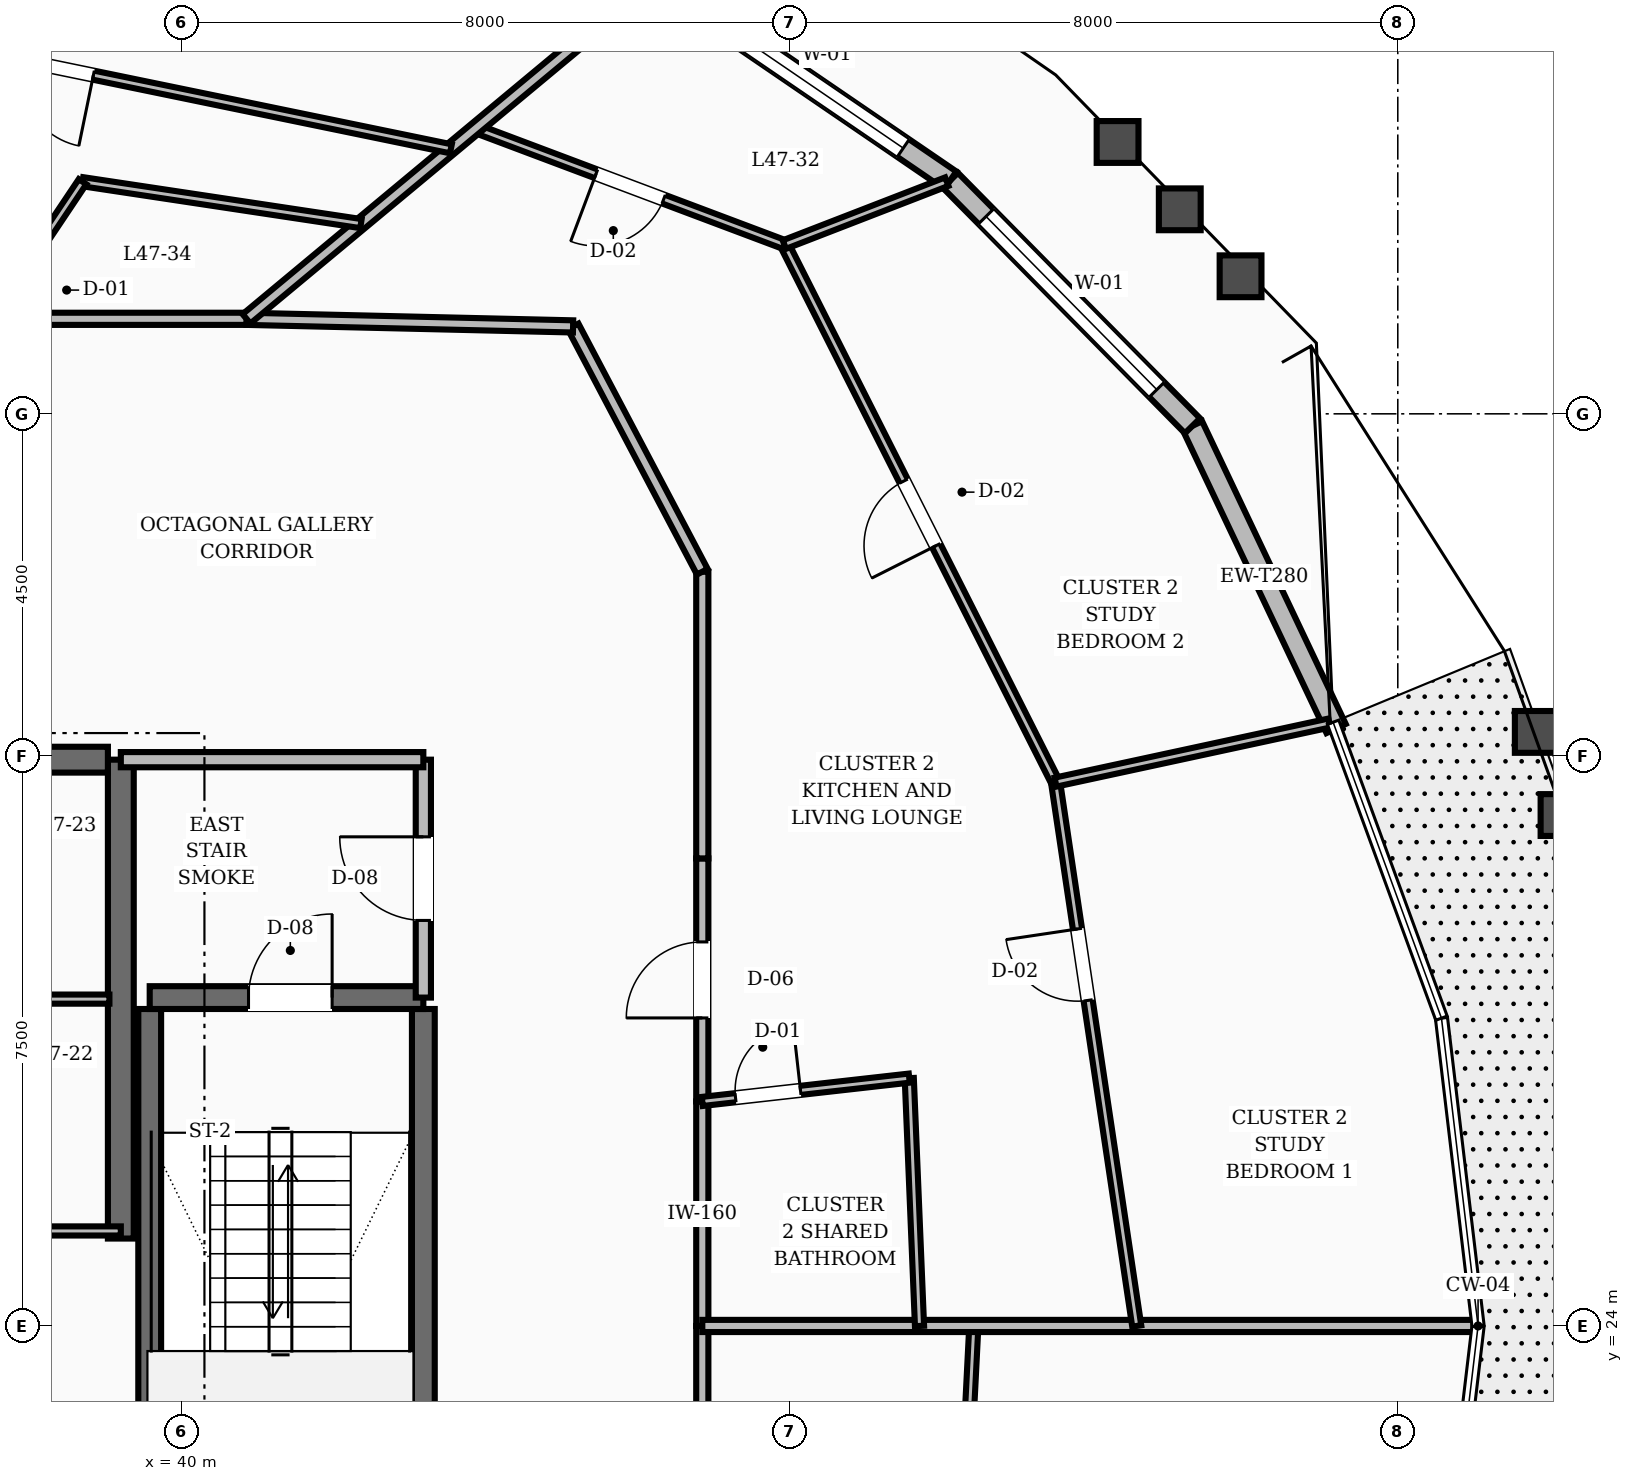
"""IFC4 building model, lengths in metres.
Left out: names, types, materials, properties, quantities, classifications, styles, units other than length and angle.
Written with IfcOpenShell. Run it as: python <this file> out.ifc"""

import sys

from ifc_helpers import new_model, si_unit, direction, frame, frame_2d, origin, place, context, subcontext, project, spatial, rectangle, extrude, element, fill, save


model = new_model("IFC4")
c1 = context("Model", 3, precision=1e-05, world=origin(), true_north=direction((0.0, 1.0)))
c2 = subcontext(c1, "Body", "Model", "MODEL_VIEW")
j1 = project(units=[si_unit("LENGTHUNIT", "METRE"), si_unit("PLANEANGLEUNIT", "RADIAN")], contexts=[c1])
p1 = place(None, origin())
s1 = spatial("IfcSite", under=j1, at=p1, CompositionType="ELEMENT")
p2 = place(p1, origin())
s2 = spatial("IfcBuilding", under=s1, at=p2, CompositionType="ELEMENT")
p3 = place(p2, frame((0.0, 0.0, 182.0)))
s3 = spatial("IfcBuildingStorey", under=s2, at=p3, CompositionType="ELEMENT", Elevation=182.0)
p4 = place(p3, frame((39.2, 25.15, 0.0), z_axis=(0.0, 0.0, 1.0), x_axis=(0.0, 1.0, 0.0)))
e1 = element("IfcWall", 1, at=p4, inside=s3, PredefinedType="SHEAR", context=c2, shape_type="SweptSolid", body=[
    extrude(rectangle(XDim=6.3, YDim=0.34, at=frame_2d((3.15, 0.0))), origin(), (0.0, 0.0, 1.0), 3.6),
])
p5 = place(p3, frame((35.8, 31.45, 0.0), z_axis=(0.0, 0.0, 1.0), x_axis=(1.0, 0.0, 0.0)))
e2 = element("IfcWall", 2, at=p5, inside=s3, PredefinedType="SHEAR", context=c2, shape_type="SweptSolid", body=[
    extrude(rectangle(XDim=3.23, YDim=0.34, at=frame_2d((1.615, 0.0))), origin(), (0.0, 0.0, 1.0), 3.6),
])
p6 = place(p5, frame((0.3, 0.0, 0.0)))
e3 = element("IfcOpeningElement", 3, at=p6, cuts=e2, PredefinedType="OPENING", context=c2, shape_type="SweptSolid", body=[
    extrude(rectangle(XDim=1.1, YDim=2.1, at=frame_2d((0.55, 1.05))), frame((0.0, 0.18, 0.0), z_axis=(0.0, -1.0, 0.0), x_axis=(1.0, 0.0, 0.0)), (0.0, 0.0, 1.0), 0.36),
])
for number, where, z_axis, x_axis in (
    (4, (43.18, 19.43, 0.0), (0.0, 0.0, 1.0), (0.0, 1.0, 0.0)),
    (5, (39.58, 19.43, 0.0), (0.0, 0.0, 1.0), (0.0, 1.0, 0.0)),
):
    element("IfcWall", number, at=place(p3, frame(where, z_axis=z_axis, x_axis=x_axis)), inside=s3, PredefinedType="SHEAR", context=c2, shape_type="SweptSolid", body=[
        extrude(rectangle(XDim=8.74, YDim=0.3, at=frame_2d((4.37, 0.0))), origin(), (0.0, 0.0, 1.0), 3.6),
    ])
p7 = place(p3, frame((39.58, 28.32, 0.0), z_axis=(0.0, 0.0, 1.0), x_axis=(1.0, 0.0, 0.0)))
e6 = element("IfcWall", 6, at=p7, inside=s3, PredefinedType="SHEAR", context=c2, shape_type="SweptSolid", body=[
    extrude(rectangle(XDim=3.6, YDim=0.3, at=frame_2d((1.8, 0.0))), origin(), (0.0, 0.0, 1.0), 3.6),
])
p8 = place(p7, frame((1.3, 0.0, 0.0)))
e7 = element("IfcOpeningElement", 7, at=p8, cuts=e6, PredefinedType="OPENING", context=c2, shape_type="SweptSolid", body=[
    extrude(rectangle(XDim=1.1, YDim=2.1, at=frame_2d((0.55, 1.05))), frame((0.0, 0.16, 0.0), z_axis=(0.0, -1.0, 0.0), x_axis=(1.0, 0.0, 0.0)), (0.0, 0.0, 1.0), 0.32),
])
p9 = place(p3, frame((55.188, 31.86, 0.0), z_axis=(0.0, 0.0, 1.0), x_axis=(-0.428595800286, 0.903496341983, 0.0)))
e8 = element("IfcWall", 8, at=p9, inside=s3, PredefinedType="STANDARD", context=c2, shape_type="SweptSolid", body=[
    extrude(rectangle(XDim=4.408, YDim=0.28, at=frame_2d((2.204, 0.0))), origin(), (0.0, 0.0, 1.0), 2.82),
])
p10 = place(p3, frame((53.299, 35.842, 0.0), z_axis=(0.0, 0.0, 1.0), x_axis=(-0.70219293187, 0.711986717876, 0.0)))
e9 = element("IfcWall", 9, at=p10, inside=s3, PredefinedType="STANDARD", context=c2, shape_type="SweptSolid", body=[
    extrude(rectangle(XDim=4.537, YDim=0.28, at=frame_2d((2.269, 0.0))), origin(), (0.0, 0.0, 1.0), 2.82),
])
p11 = place(p10, frame((0.668, 0.0, 0.8)))
e10 = element("IfcOpeningElement", 10, at=p11, cuts=e9, PredefinedType="OPENING", context=c2, shape_type="SweptSolid", body=[
    extrude(rectangle(XDim=3.2, YDim=1.65, at=frame_2d((1.6, 0.825))), frame((0.0, 0.15, 0.0), z_axis=(0.0, -1.0, 0.0), x_axis=(1.0, 0.0, 0.0)), (0.0, 0.0, 1.0), 0.3),
])
p12 = place(p3, frame((50.113, 39.073, 0.0), z_axis=(0.0, 0.0, 1.0), x_axis=(-0.825797441916, 0.563966829632, 0.0)))
e11 = element("IfcWall", 11, at=p12, inside=s3, PredefinedType="STANDARD", context=c2, shape_type="SweptSolid", body=[
    extrude(rectangle(XDim=4.7, YDim=0.28, at=frame_2d((2.35, 0.0))), origin(), (0.0, 0.0, 1.0), 2.82),
])
p13 = place(p12, frame((0.75, 0.0, 0.8)))
e12 = element("IfcOpeningElement", 12, at=p13, cuts=e11, PredefinedType="OPENING", context=c2, shape_type="SweptSolid", body=[
    extrude(rectangle(XDim=3.2, YDim=1.65, at=frame_2d((1.6, 0.825))), frame((0.0, 0.15, 0.0), z_axis=(0.0, -1.0, 0.0), x_axis=(1.0, 0.0, 0.0)), (0.0, 0.0, 1.0), 0.3),
])
p14 = place(p3, frame((43.18, 28.32, 0.0), z_axis=(0.0, 0.0, 1.0), x_axis=(0.0, 1.0, 0.0)))
e13 = element("IfcWall", 13, at=p14, inside=s3, PredefinedType="SOLIDWALL", context=c2, shape_type="SweptSolid", body=[
    extrude(rectangle(XDim=3.13, YDim=0.2, at=frame_2d((1.565, 0.0))), origin(), (0.0, 0.0, 1.0), 2.8),
])
p15 = place(p14, frame((1.015, 0.0, 0.0)))
e14 = element("IfcOpeningElement", 14, at=p15, cuts=e13, PredefinedType="OPENING", context=c2, shape_type="SweptSolid", body=[
    extrude(rectangle(XDim=1.1, YDim=2.1, at=frame_2d((0.55, 1.05))), frame((0.0, 0.11, 0.0), z_axis=(0.0, -1.0, 0.0), x_axis=(1.0, 0.0, 0.0)), (0.0, 0.0, 1.0), 0.22),
])
p16 = place(p3, frame((39.2, 31.45, 0.0), z_axis=(0.0, 0.0, 1.0), x_axis=(1.0, 0.0, 0.0)))
e15 = element("IfcWall", 15, at=p16, inside=s3, PredefinedType="SOLIDWALL", context=c2, shape_type="SweptSolid", body=[
    extrude(rectangle(XDim=3.98, YDim=0.2, at=frame_2d((1.99, 0.0))), origin(), (0.0, 0.0, 1.0), 2.8),
])
p17 = place(p3, frame((37.4, 25.25, 0.0), z_axis=(0.0, 0.0, 1.0), x_axis=(1.0, 0.0, 0.0)))
e16 = element("IfcWall", 16, at=p17, inside=s3, PredefinedType="PARTITIONING", context=c2, shape_type="SweptSolid", body=[
    extrude(rectangle(XDim=1.8, YDim=0.12, at=frame_2d((0.9, 0.0))), origin(), (0.0, 0.0, 1.0), 2.8),
])
p18 = place(p3, frame((37.4, 28.3, 0.0), z_axis=(0.0, 0.0, 1.0), x_axis=(1.0, 0.0, 0.0)))
e17 = element("IfcWall", 17, at=p18, inside=s3, PredefinedType="PARTITIONING", context=c2, shape_type="SweptSolid", body=[
    extrude(rectangle(XDim=1.65, YDim=0.12, at=frame_2d((0.825, 0.0))), origin(), (0.0, 0.0, 1.0), 2.8),
])
p19 = place(p3, frame((46.85, 24.0, 0.0), z_axis=(0.0, 0.0, 1.0), x_axis=(0.0, 1.0, 0.0)))
e18 = element("IfcWall", 18, at=p19, inside=s3, PredefinedType="SOLIDWALL", context=c2, shape_type="SweptSolid", body=[
    extrude(rectangle(XDim=2.954, YDim=0.16, at=frame_2d((1.477, 0.0))), origin(), (0.0, 0.0, 1.0), 2.8),
])
p20 = place(p3, frame((46.85, 26.954, 0.0), z_axis=(0.0, 0.0, 1.0), x_axis=(0.0, 1.0, 0.0)))
e19 = element("IfcWall", 19, at=p20, inside=s3, PredefinedType="SOLIDWALL", context=c2, shape_type="SweptSolid", body=[
    extrude(rectangle(XDim=3.197, YDim=0.16, at=frame_2d((1.599, 0.0))), origin(), (0.0, 0.0, 1.0), 2.8),
])
p21 = place(p20, frame((1.099, 0.0, 0.0)))
e20 = element("IfcOpeningElement", 20, at=p21, cuts=e19, PredefinedType="OPENING", context=c2, shape_type="SweptSolid", body=[
    extrude(rectangle(XDim=1.0, YDim=2.1, at=frame_2d((0.5, 1.05))), frame((0.0, 0.09, 0.0), z_axis=(0.0, -1.0, 0.0), x_axis=(1.0, 0.0, 0.0)), (0.0, 0.0, 1.0), 0.18),
])
p22 = place(p3, frame((46.85, 30.151, 0.0), z_axis=(0.0, 0.0, 1.0), x_axis=(0.0, 1.0, 0.0)))
e21 = element("IfcWall", 21, at=p22, inside=s3, PredefinedType="SOLIDWALL", context=c2, shape_type="SweptSolid", body=[
    extrude(rectangle(XDim=3.771, YDim=0.16, at=frame_2d((1.886, 0.0))), origin(), (0.0, 0.0, 1.0), 2.8),
])
p23 = place(p3, frame((46.85, 33.923, 0.0), z_axis=(0.0, 0.0, 1.0), x_axis=(-0.466093963429, 0.884735224378, 0.0)))
e22 = element("IfcWall", 22, at=p23, inside=s3, PredefinedType="SOLIDWALL", context=c2, shape_type="SweptSolid", body=[
    extrude(rectangle(XDim=3.648, YDim=0.16, at=frame_2d((1.824, 0.0))), origin(), (0.0, 0.0, 1.0), 2.8),
])
p24 = place(p3, frame((45.15, 37.15, 0.0), z_axis=(0.0, 0.0, 1.0), x_axis=(-0.999728709658, 0.023291781507, 0.0)))
e23 = element("IfcWall", 23, at=p24, inside=s3, PredefinedType="SOLIDWALL", context=c2, shape_type="SweptSolid", body=[
    extrude(rectangle(XDim=4.298, YDim=0.16, at=frame_2d((2.149, 0.0))), origin(), (0.0, 0.0, 1.0), 2.8),
])
p25 = place(p3, frame((40.854, 37.25, 0.0), z_axis=(0.0, 0.0, 1.0), x_axis=(-1.0, 0.0, 0.0)))
e24 = element("IfcWall", 24, at=p25, inside=s3, PredefinedType="SOLIDWALL", context=c2, shape_type="SweptSolid", body=[
    extrude(rectangle(XDim=3.365, YDim=0.16, at=frame_2d((1.683, 0.0))), origin(), (0.0, 0.0, 1.0), 2.8),
])
p26 = place(p3, frame((46.85, 21.046, 0.0), z_axis=(0.0, 0.0, 1.0), x_axis=(0.0, 1.0, 0.0)))
e25 = element("IfcWall", 25, at=p26, inside=s3, PredefinedType="SOLIDWALL", context=c2, shape_type="SweptSolid", body=[
    extrude(rectangle(XDim=2.954, YDim=0.16, at=frame_2d((1.477, 0.0))), origin(), (0.0, 0.0, 1.0), 2.8),
])
p27 = place(p3, frame((50.254, 20.663, 0.0), z_axis=(0.0, 0.0, 1.0), x_axis=(0.050414994906, 0.998728355605, 0.0)))
e26 = element("IfcWall", 26, at=p27, inside=s3, PredefinedType="PARTITIONING", context=c2, shape_type="SweptSolid", body=[
    extrude(rectangle(XDim=3.341, YDim=0.12, at=frame_2d((1.671, 0.0))), origin(), (0.0, 0.0, 1.0), 2.8),
])
p28 = place(p3, frame((46.85, 24.0, 0.0), z_axis=(0.0, 0.0, 1.0), x_axis=(1.0, 0.0, 0.0)))
e27 = element("IfcWall", 27, at=p28, inside=s3, PredefinedType="SOLIDWALL", context=c2, shape_type="SweptSolid", body=[
    extrude(rectangle(XDim=10.156, YDim=0.16, at=frame_2d((5.078, 0.0))), origin(), (0.0, 0.0, 1.0), 2.8),
])
p29 = place(p3, frame((49.708, 24.0, 0.0), z_axis=(0.0, 0.0, 1.0), x_axis=(-0.041297572746, 0.999146891345, 0.0)))
e28 = element("IfcWall", 28, at=p29, inside=s3, PredefinedType="PARTITIONING", context=c2, shape_type="SweptSolid", body=[
    extrude(rectangle(XDim=3.263, YDim=0.12, at=frame_2d((1.632, 0.0))), origin(), (0.0, 0.0, 1.0), 2.8),
])
p30 = place(p3, frame((46.85, 26.954, 0.0), z_axis=(0.0, 0.0, 1.0), x_axis=(0.993718565595, 0.111908053294, 0.0)))
e29 = element("IfcWall", 29, at=p30, inside=s3, PredefinedType="PARTITIONING", context=c2, shape_type="SweptSolid", body=[
    extrude(rectangle(XDim=2.74, YDim=0.12, at=frame_2d((1.37, 0.0))), origin(), (0.0, 0.0, 1.0), 2.8),
])
p31 = place(p30, frame((0.44, 0.0, 0.0)))
e30 = element("IfcOpeningElement", 30, at=p31, cuts=e29, PredefinedType="OPENING", context=c2, shape_type="SweptSolid", body=[
    extrude(rectangle(XDim=0.86, YDim=2.1, at=frame_2d((0.43, 1.05))), frame((0.0, 0.07, 0.0), z_axis=(0.0, -1.0, 0.0), x_axis=(1.0, 0.0, 0.0)), (0.0, 0.0, 1.0), 0.14),
])
p32 = place(p3, frame((52.565, 24.0, 0.0), z_axis=(0.0, 0.0, 1.0), x_axis=(-0.147655518548, 0.989038850522, 0.0)))
e31 = element("IfcWall", 31, at=p32, inside=s3, PredefinedType="PARTITIONING", context=c2, shape_type="SweptSolid", body=[
    extrude(rectangle(XDim=7.234, YDim=0.12, at=frame_2d((3.617, 0.0))), origin(), (0.0, 0.0, 1.0), 2.8),
])
p33 = place(p32, frame((4.331, 0.0, 0.0)))
e32 = element("IfcOpeningElement", 32, at=p33, cuts=e31, PredefinedType="OPENING", context=c2, shape_type="SweptSolid", body=[
    extrude(rectangle(XDim=0.95, YDim=2.1, at=frame_2d((0.475, 1.05))), frame((0.0, 0.07, 0.0), z_axis=(0.0, -1.0, 0.0), x_axis=(1.0, 0.0, 0.0)), (0.0, 0.0, 1.0), 0.14),
])
p34 = place(p3, frame((51.497, 31.155, 0.0), z_axis=(0.0, 0.0, 1.0), x_axis=(-0.450428488071, 0.892812509508, 0.0)))
e33 = element("IfcWall", 33, at=p34, inside=s3, PredefinedType="PARTITIONING", context=c2, shape_type="SweptSolid", body=[
    extrude(rectangle(XDim=7.921, YDim=0.12, at=frame_2d((3.96, 0.0))), origin(), (0.0, 0.0, 1.0), 2.8),
])
p35 = place(p34, frame((3.486, 0.0, 0.0)))
e34 = element("IfcOpeningElement", 34, at=p35, cuts=e33, PredefinedType="OPENING", context=c2, shape_type="SweptSolid", body=[
    extrude(rectangle(XDim=0.95, YDim=2.1, at=frame_2d((0.475, 1.05))), frame((0.0, 0.07, 0.0), z_axis=(0.0, -1.0, 0.0), x_axis=(1.0, 0.0, 0.0)), (0.0, 0.0, 1.0), 0.14),
])
p36 = place(p3, frame((51.497, 31.155, 0.0), z_axis=(0.0, 0.0, 1.0), x_axis=(0.977478463265, 0.211035195769, 0.0)))
e35 = element("IfcWall", 35, at=p36, inside=s3, PredefinedType="PARTITIONING", context=c2, shape_type="SweptSolid", body=[
    extrude(rectangle(XDim=3.686, YDim=0.12, at=frame_2d((1.843, 0.0))), origin(), (0.0, 0.0, 1.0), 2.8),
])
p37 = place(p3, frame((47.929, 38.227, 0.0), z_axis=(0.0, 0.0, 1.0), x_axis=(-0.935989074673, 0.352029050071, 0.0)))
e36 = element("IfcWall", 36, at=p37, inside=s3, PredefinedType="PARTITIONING", context=c2, shape_type="SweptSolid", body=[
    extrude(rectangle(XDim=4.342, YDim=0.12, at=frame_2d((2.171, 0.0))), origin(), (0.0, 0.0, 1.0), 2.8),
])
p38 = place(p37, frame((1.696, 0.0, 0.0)))
e37 = element("IfcOpeningElement", 37, at=p38, cuts=e36, PredefinedType="OPENING", context=c2, shape_type="SweptSolid", body=[
    extrude(rectangle(XDim=0.95, YDim=2.1, at=frame_2d((0.475, 1.05))), frame((0.0, 0.07, 0.0), z_axis=(0.0, -1.0, 0.0), x_axis=(1.0, 0.0, 0.0)), (0.0, 0.0, 1.0), 0.14),
])
p39 = place(p3, frame((47.929, 38.227, 0.0), z_axis=(0.0, 0.0, 1.0), x_axis=(0.932497523424, 0.36117636801, 0.0)))
e38 = element("IfcWall", 38, at=p39, inside=s3, PredefinedType="PARTITIONING", context=c2, shape_type="SweptSolid", body=[
    extrude(rectangle(XDim=2.292, YDim=0.12, at=frame_2d((1.146, 0.0))), origin(), (0.0, 0.0, 1.0), 2.8),
])
p40 = place(p3, frame((40.854, 37.25, 0.0), z_axis=(0.0, 0.0, 1.0), x_axis=(0.768805862504, 0.639482248213, 0.0)))
e39 = element("IfcWall", 39, at=p40, inside=s3, PredefinedType="SOLIDWALL", context=c2, shape_type="SweptSolid", body=[
    extrude(rectangle(XDim=6.945, YDim=0.16, at=frame_2d((3.473, 0.0))), origin(), (0.0, 0.0, 1.0), 2.8),
])
p41 = place(p3, frame((42.359, 38.503, 0.0), z_axis=(0.0, 0.0, 1.0), x_axis=(-0.988854990304, 0.148881859711, 0.0)))
e40 = element("IfcWall", 40, at=p41, inside=s3, PredefinedType="PARTITIONING", context=c2, shape_type="SweptSolid", body=[
    extrude(rectangle(XDim=3.704, YDim=0.12, at=frame_2d((1.852, 0.0))), origin(), (0.0, 0.0, 1.0), 2.8),
])
p42 = place(p3, frame((37.488, 37.25, 0.0), z_axis=(0.0, 0.0, 1.0), x_axis=(0.556359763528, 0.830941522327, 0.0)))
e41 = element("IfcWall", 41, at=p42, inside=s3, PredefinedType="PARTITIONING", context=c2, shape_type="SweptSolid", body=[
    extrude(rectangle(XDim=2.171, YDim=0.12, at=frame_2d((1.086, 0.0))), origin(), (0.0, 0.0, 1.0), 2.8),
])
p43 = place(p42, frame((0.44, 0.0, 0.0)))
e42 = element("IfcOpeningElement", 42, at=p43, cuts=e41, PredefinedType="OPENING", context=c2, shape_type="SweptSolid", body=[
    extrude(rectangle(XDim=0.86, YDim=2.1, at=frame_2d((0.43, 1.05))), frame((0.0, 0.07, 0.0), z_axis=(0.0, -1.0, 0.0), x_axis=(1.0, 0.0, 0.0)), (0.0, 0.0, 1.0), 0.14),
])
p44 = place(p3, frame((43.542, 39.487, 0.0), z_axis=(0.0, 0.0, 1.0), x_axis=(-0.979440858822, 0.201731514814, 0.0)))
e43 = element("IfcWall", 43, at=p44, inside=s3, PredefinedType="PARTITIONING", context=c2, shape_type="SweptSolid", body=[
    extrude(rectangle(XDim=7.888, YDim=0.12, at=frame_2d((3.944, 0.0))), origin(), (0.0, 0.0, 1.0), 2.8),
])
p45 = place(p44, frame((4.802, 0.0, 0.0)))
e44 = element("IfcOpeningElement", 44, at=p45, cuts=e43, PredefinedType="OPENING", context=c2, shape_type="SweptSolid", body=[
    extrude(rectangle(XDim=0.95, YDim=2.1, at=frame_2d((0.475, 1.05))), frame((0.0, 0.07, 0.0), z_axis=(0.0, -1.0, 0.0), x_axis=(1.0, 0.0, 0.0)), (0.0, 0.0, 1.0), 0.14),
])
p46 = place(p11, origin())
e45 = element("IfcWindow", 45, at=p46, inside=s3, PartitioningType="SINGLE_PANEL", PredefinedType="WINDOW", context=c2, shape_type="SweptSolid", body=[
    extrude(rectangle(XDim=3.2, YDim=1.65, at=frame_2d((1.6, 0.825))), frame((0.0, 0.03, 0.0), z_axis=(0.0, -1.0, 0.0), x_axis=(1.0, 0.0, 0.0)), (0.0, 0.0, 1.0), 0.06),
])
fill(e10, e45)
p47 = place(p13, origin())
e46 = element("IfcWindow", 46, at=p47, inside=s3, PartitioningType="SINGLE_PANEL", PredefinedType="WINDOW", context=c2, shape_type="SweptSolid", body=[
    extrude(rectangle(XDim=3.2, YDim=1.65, at=frame_2d((1.6, 0.825))), frame((0.0, 0.03, 0.0), z_axis=(0.0, -1.0, 0.0), x_axis=(1.0, 0.0, 0.0)), (0.0, 0.0, 1.0), 0.06),
])
fill(e12, e46)
p48 = place(p8, origin())
e47 = element("IfcDoor", 47, at=p48, inside=s3, OperationType="SINGLE_SWING_RIGHT", PredefinedType="DOOR", context=c2, shape_type="SweptSolid", body=[
    extrude(rectangle(XDim=1.1, YDim=2.1, at=frame_2d((0.55, 1.05))), frame((0.0, 0.025, 0.0), z_axis=(0.0, -1.0, 0.0), x_axis=(1.0, 0.0, 0.0)), (0.0, 0.0, 1.0), 0.05),
])
fill(e7, e47)
p49 = place(p15, origin())
e48 = element("IfcDoor", 48, at=p49, inside=s3, OperationType="SINGLE_SWING_RIGHT", PredefinedType="DOOR", context=c2, shape_type="SweptSolid", body=[
    extrude(rectangle(XDim=1.1, YDim=2.1, at=frame_2d((0.55, 1.05))), frame((0.0, 0.025, 0.0), z_axis=(0.0, -1.0, 0.0), x_axis=(1.0, 0.0, 0.0)), (0.0, 0.0, 1.0), 0.05),
])
fill(e14, e48)
p50 = place(p31, origin())
e49 = element("IfcDoor", 49, at=p50, inside=s3, OperationType="SINGLE_SWING_RIGHT", PredefinedType="DOOR", context=c2, shape_type="SweptSolid", body=[
    extrude(rectangle(XDim=0.86, YDim=2.1, at=frame_2d((0.43, 1.05))), frame((0.0, 0.025, 0.0), z_axis=(0.0, -1.0, 0.0), x_axis=(1.0, 0.0, 0.0)), (0.0, 0.0, 1.0), 0.05),
])
fill(e30, e49)
p51 = place(p21, origin())
e50 = element("IfcDoor", 50, at=p51, inside=s3, OperationType="SINGLE_SWING_LEFT", PredefinedType="DOOR", context=c2, shape_type="SweptSolid", body=[
    extrude(rectangle(XDim=1.0, YDim=2.1, at=frame_2d((0.5, 1.05))), frame((0.0, 0.025, 0.0), z_axis=(0.0, -1.0, 0.0), x_axis=(1.0, 0.0, 0.0)), (0.0, 0.0, 1.0), 0.05),
])
fill(e20, e50)
p52 = place(p33, origin())
e51 = element("IfcDoor", 51, at=p52, inside=s3, OperationType="SINGLE_SWING_RIGHT", PredefinedType="DOOR", context=c2, shape_type="SweptSolid", body=[
    extrude(rectangle(XDim=0.95, YDim=2.1, at=frame_2d((0.475, 1.05))), frame((0.0, 0.025, 0.0), z_axis=(0.0, -1.0, 0.0), x_axis=(1.0, 0.0, 0.0)), (0.0, 0.0, 1.0), 0.05),
])
fill(e32, e51)
p53 = place(p35, origin())
e52 = element("IfcDoor", 52, at=p53, inside=s3, OperationType="SINGLE_SWING_LEFT", PredefinedType="DOOR", context=c2, shape_type="SweptSolid", body=[
    extrude(rectangle(XDim=0.95, YDim=2.1, at=frame_2d((0.475, 1.05))), frame((0.0, 0.025, 0.0), z_axis=(0.0, -1.0, 0.0), x_axis=(1.0, 0.0, 0.0)), (0.0, 0.0, 1.0), 0.05),
])
fill(e34, e52)
p54 = place(p38, origin())
e53 = element("IfcDoor", 53, at=p54, inside=s3, OperationType="SINGLE_SWING_RIGHT", PredefinedType="DOOR", context=c2, shape_type="SweptSolid", body=[
    extrude(rectangle(XDim=0.95, YDim=2.1, at=frame_2d((0.475, 1.05))), frame((0.0, 0.025, 0.0), z_axis=(0.0, -1.0, 0.0), x_axis=(1.0, 0.0, 0.0)), (0.0, 0.0, 1.0), 0.05),
])
fill(e37, e53)
p55 = place(p45, origin())
e54 = element("IfcDoor", 54, at=p55, inside=s3, OperationType="SINGLE_SWING_LEFT", PredefinedType="DOOR", context=c2, shape_type="SweptSolid", body=[
    extrude(rectangle(XDim=0.95, YDim=2.1, at=frame_2d((0.475, 1.05))), frame((0.0, 0.025, 0.0), z_axis=(0.0, -1.0, 0.0), x_axis=(1.0, 0.0, 0.0)), (0.0, 0.0, 1.0), 0.05),
])
fill(e44, e54)
save(model, sys.argv[1])
